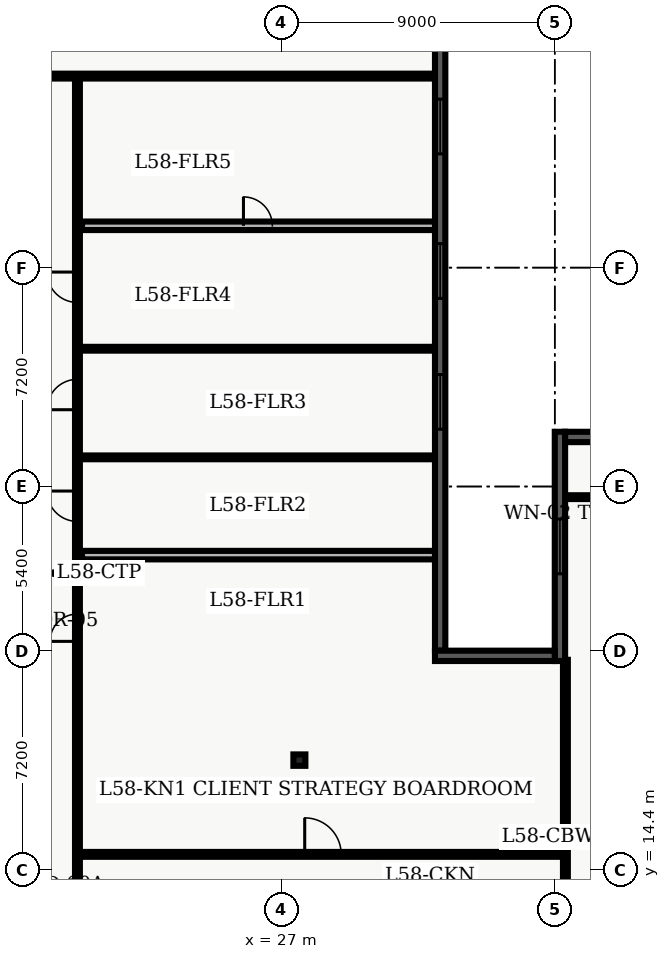
"""IFC4 building model, lengths in metres.
Left out: names, types, materials, properties, quantities, classifications, styles, units other than length and angle.
Written with IfcOpenShell. Run it as: python <this file> out.ifc"""

import sys

from ifc_helpers import new_model, entity, si_unit, converted_unit, direction, frame, origin_with_axes, origin_2d_with_axis, place, context, subcontext, project, spatial, polyline, rectangle, i_section, outline, extrude, element, fill, save


model = new_model("IFC4")
c1 = context("Model", 3, precision=1e-05, world=origin_with_axes(), true_north=direction((0.0, 1.0)))
c2 = subcontext(c1, "Body", "Model", "MODEL_VIEW")
j1 = project(units=[si_unit("LENGTHUNIT", "METRE"), converted_unit("PLANEANGLEUNIT", "DEGREE", entity("IfcPlaneAngleMeasure", 0.017), si_unit("PLANEANGLEUNIT", "RADIAN"), dimensions=[0, 0, 0, 0, 0, 0, 0])], contexts=[c1])
p1 = place(None, origin_with_axes())
s1 = spatial("IfcSite", under=j1, at=p1, CompositionType="ELEMENT")
p2 = place(p1, origin_with_axes())
s2 = spatial("IfcBuilding", under=s1, at=p2, CompositionType="ELEMENT")
p3 = place(p2, frame((0.0, 0.0, 236.4), z_axis=(0.0, 0.0, 1.0), x_axis=(1.0, 0.0, 0.0)))
s3 = spatial("IfcBuildingStorey", under=s2, at=p3, CompositionType="ELEMENT", Elevation=236.4)
p4 = place(p3, frame((27.6, 18.0, 0.0), z_axis=(0.0, 0.0, 1.0), x_axis=(1.0, 0.0, 0.0)))
e1 = element("IfcColumn", 1, at=p4, inside=s3, PredefinedType="COLUMN", context=c2, shape_type="SweptSolid", body=[
    extrude(i_section(OverallWidth=0.394, OverallDepth=0.375, WebThickness=0.017, FlangeThickness=0.028, FilletRadius=0.02, at=origin_2d_with_axis()), origin_with_axes(), (0.0, 0.0, 1.0), 3.9),
])
p5 = place(p3, frame((7.1, 40.5, 0.0), z_axis=(0.0, 0.0, 1.0), x_axis=(1.0, 0.0, 0.0)))
e2 = element("IfcWall", 2, at=p5, inside=s3, PredefinedType="PARTITIONING", context=c2, shape_type="SweptSolid", body=[
    extrude(outline(polyline([(0.0, -0.08), (24.965, -0.08), (24.965, 0.08), (0.0, 0.08), (0.0, -0.08)])), origin_with_axes(), (0.0, 0.0, 1.0), 2.7),
])
p6 = place(p5, frame((1.441, 0.0, 0.0), z_axis=(0.0, 0.0, 1.0), x_axis=(1.0, 0.0, 0.0)))
e3 = element("IfcOpeningElement", 3, at=p6, cuts=e2, PredefinedType="OPENING", context=c2, shape_type="SweptSolid", body=[
    extrude(rectangle(XDim=1.0, YDim=0.18, at=origin_2d_with_axis()), origin_with_axes(), (0.0, 0.0, 1.0), 2.15),
])
p7 = place(p5, frame((4.415, 0.0, 0.0), z_axis=(0.0, 0.0, 1.0), x_axis=(1.0, 0.0, 0.0)))
e4 = element("IfcOpeningElement", 4, at=p7, cuts=e2, PredefinedType="OPENING", context=c2, shape_type="SweptSolid", body=[
    extrude(rectangle(XDim=1.0, YDim=0.18, at=origin_2d_with_axis()), origin_with_axes(), (0.0, 0.0, 1.0), 2.15),
])
p8 = place(p5, frame((7.614, 0.0, 0.0), z_axis=(0.0, 0.0, 1.0), x_axis=(1.0, 0.0, 0.0)))
e5 = element("IfcOpeningElement", 5, at=p8, cuts=e2, PredefinedType="OPENING", context=c2, shape_type="SweptSolid", body=[
    extrude(rectangle(XDim=1.0, YDim=0.18, at=origin_2d_with_axis()), origin_with_axes(), (0.0, 0.0, 1.0), 2.15),
])
p9 = place(p5, frame((11.156, 0.0, 0.0), z_axis=(0.0, 0.0, 1.0), x_axis=(1.0, 0.0, 0.0)))
e6 = element("IfcOpeningElement", 6, at=p9, cuts=e2, PredefinedType="OPENING", context=c2, shape_type="SweptSolid", body=[
    extrude(rectangle(XDim=1.0, YDim=0.18, at=origin_2d_with_axis()), origin_with_axes(), (0.0, 0.0, 1.0), 2.15),
])
p10 = place(p3, frame((20.3, 7.8, 0.0), z_axis=(0.0, 0.0, 1.0), x_axis=(0.0, 1.0, 0.0)))
e7 = element("IfcWall", 7, at=p10, inside=s3, PredefinedType="PARTITIONING", context=c2, shape_type="SweptSolid", body=[
    extrude(outline(polyline([(0.0, -0.08), (32.7, -0.08), (32.7, 0.08), (0.0, 0.08), (0.0, -0.08)])), origin_with_axes(), (0.0, 0.0, 1.0), 2.7),
])
p11 = place(p10, frame((14.556, 0.0, 0.0), z_axis=(0.0, 0.0, 1.0), x_axis=(1.0, 0.0, 0.0)))
e8 = element("IfcOpeningElement", 8, at=p11, cuts=e7, PredefinedType="OPENING", context=c2, shape_type="SweptSolid", body=[
    extrude(rectangle(XDim=0.9, YDim=0.18, at=origin_2d_with_axis()), origin_with_axes(), (0.0, 0.0, 1.0), 2.15),
])
p12 = place(p10, frame((18.551, 0.0, 0.0), z_axis=(0.0, 0.0, 1.0), x_axis=(1.0, 0.0, 0.0)))
e9 = element("IfcOpeningElement", 9, at=p12, cuts=e7, PredefinedType="OPENING", context=c2, shape_type="SweptSolid", body=[
    extrude(rectangle(XDim=1.0, YDim=0.18, at=origin_2d_with_axis()), origin_with_axes(), (0.0, 0.0, 1.0), 2.15),
])
p13 = place(p10, frame((22.226, 0.0, 0.0), z_axis=(0.0, 0.0, 1.0), x_axis=(1.0, 0.0, 0.0)))
e10 = element("IfcOpeningElement", 10, at=p13, cuts=e7, PredefinedType="OPENING", context=c2, shape_type="SweptSolid", body=[
    extrude(rectangle(XDim=1.0, YDim=0.18, at=origin_2d_with_axis()), origin_with_axes(), (0.0, 0.0, 1.0), 2.15),
])
p14 = place(p10, frame((25.754, 0.0, 0.0), z_axis=(0.0, 0.0, 1.0), x_axis=(1.0, 0.0, 0.0)))
e11 = element("IfcOpeningElement", 11, at=p14, cuts=e7, PredefinedType="OPENING", context=c2, shape_type="SweptSolid", body=[
    extrude(rectangle(XDim=1.0, YDim=0.18, at=origin_2d_with_axis()), origin_with_axes(), (0.0, 0.0, 1.0), 2.15),
])
p15 = place(p10, frame((5.775, 0.0, 0.0), z_axis=(0.0, 0.0, 1.0), x_axis=(1.0, 0.0, 0.0)))
e12 = element("IfcOpeningElement", 12, at=p15, cuts=e7, PredefinedType="OPENING", context=c2, shape_type="SweptSolid", body=[
    extrude(rectangle(XDim=1.05, YDim=0.18, at=origin_2d_with_axis()), origin_with_axes(), (0.0, 0.0, 1.0), 2.15),
])
p16 = place(p3, frame((20.45, 24.743, 0.0), z_axis=(0.0, 0.0, 1.0), x_axis=(1.0, 0.0, 0.0)))
e13 = element("IfcWall", 13, at=p16, inside=s3, PredefinedType="PARTITIONING", context=c2, shape_type="SweptSolid", body=[
    extrude(outline(polyline([(0.0, -0.14), (11.615, -0.14), (11.615, 0.14), (0.0, 0.14), (0.0, -0.14)])), origin_with_axes(), (0.0, 0.0, 1.0), 2.7),
])
for number, where, z_axis, x_axis in (
    (14, (20.45, 27.959, 0.0), (0.0, 0.0, 1.0), (1.0, 0.0, 0.0)),
    (15, (20.45, 31.532, 0.0), (0.0, 0.0, 1.0), (1.0, 0.0, 0.0)),
):
    element("IfcWall", number, at=place(p3, frame(where, z_axis=z_axis, x_axis=x_axis)), inside=s3, PredefinedType="PARTITIONING", context=c2, shape_type="SweptSolid", body=[
        extrude(outline(polyline([(0.0, -0.062), (11.615, -0.062), (11.615, 0.062), (0.0, 0.062), (0.0, -0.062)])), origin_with_axes(), (0.0, 0.0, 1.0), 2.7),
    ])
p17 = place(p3, frame((20.45, 35.576, 0.0), z_axis=(0.0, 0.0, 1.0), x_axis=(1.0, 0.0, 0.0)))
e16 = element("IfcWall", 16, at=p17, inside=s3, PredefinedType="PARTITIONING", context=c2, shape_type="SweptSolid", body=[
    extrude(outline(polyline([(0.0, -0.14), (11.615, -0.14), (11.615, 0.14), (0.0, 0.14), (0.0, -0.14)])), origin_with_axes(), (0.0, 0.0, 1.0), 2.7),
])
p18 = place(p17, frame((5.785, 0.0, 0.0), z_axis=(0.0, 0.0, 1.0), x_axis=(1.0, 0.0, 0.0)))
e17 = element("IfcOpeningElement", 17, at=p18, cuts=e16, PredefinedType="OPENING", context=c2, shape_type="SweptSolid", body=[
    extrude(rectangle(XDim=0.95, YDim=0.3, at=origin_2d_with_axis()), origin_with_axes(), (0.0, 0.0, 1.0), 2.15),
])
p19 = place(p3, frame((20.3, 14.9, 0.0), z_axis=(0.0, 0.0, 1.0), x_axis=(1.0, 0.0, 0.0)))
e18 = element("IfcWall", 18, at=p19, inside=s3, PredefinedType="PARTITIONING", context=c2, shape_type="SweptSolid", body=[
    extrude(outline(polyline([(0.0, -0.08), (16.05, -0.08), (16.05, 0.08), (0.0, 0.08), (0.0, -0.08)])), origin_with_axes(), (0.0, 0.0, 1.0), 2.7),
])
p20 = place(p19, frame((8.075, 0.0, 0.0), z_axis=(0.0, 0.0, 1.0), x_axis=(1.0, 0.0, 0.0)))
e19 = element("IfcOpeningElement", 19, at=p20, cuts=e18, PredefinedType="OPENING", context=c2, shape_type="SweptSolid", body=[
    extrude(rectangle(XDim=1.2, YDim=0.18, at=origin_2d_with_axis()), origin_with_axes(), (0.0, 0.0, 1.0), 2.2),
])
p21 = place(p3, frame((36.35, 4.35, 0.0), z_axis=(0.0, 0.0, 1.0), x_axis=(0.0, 1.0, 0.0)))
e20 = element("IfcWall", 20, at=p21, inside=s3, PredefinedType="PARTITIONING", context=c2, shape_type="SweptSolid", body=[
    extrude(outline(polyline([(0.0, -0.08), (16.95, -0.08), (16.95, 0.08), (0.0, 0.08), (0.0, -0.08)])), origin_with_axes(), (0.0, 0.0, 1.0), 2.7),
])
p22 = place(p3, frame((36.335, 26.65, 0.0), z_axis=(0.0, 0.0, 1.0), x_axis=(1.0, 0.0, 0.0)))
e21 = element("IfcWall", 21, at=p22, inside=s3, PredefinedType="PARTITIONING", context=c2, shape_type="SweptSolid", body=[
    extrude(outline(polyline([(0.0, -0.062), (11.195, -0.062), (11.195, 0.062), (0.0, 0.062), (0.0, -0.062)])), origin_with_axes(), (0.0, 0.0, 1.0), 2.7),
])
p23 = place(p22, frame((6.665, 0.0, 0.0), z_axis=(0.0, 0.0, 1.0), x_axis=(1.0, 0.0, 0.0)))
e22 = element("IfcOpeningElement", 22, at=p23, cuts=e21, PredefinedType="OPENING", context=c2, shape_type="SweptSolid", body=[
    extrude(rectangle(XDim=1.0, YDim=0.145, at=origin_2d_with_axis()), origin_with_axes(), (0.0, 0.0, 1.0), 2.15),
])
p24 = place(p3, frame((36.17, 21.26, 0.0), z_axis=(0.0, 0.0, 1.0), x_axis=(0.0, 1.0, 0.0)))
e23 = element("IfcWall", 23, at=p24, inside=s3, PredefinedType="SOLIDWALL", context=c2, shape_type="SweptSolid", body=[
    extrude(outline(polyline([(0.0, -0.17), (7.54, -0.17), (7.54, 0.17), (0.0, 0.17), (0.0, -0.17)])), origin_with_axes(), (0.0, 0.0, 1.0), 3.66),
])
p25 = place(p24, frame((3.77, 0.0, 0.45), z_axis=(0.0, 0.0, 1.0), x_axis=(1.0, 0.0, 0.0)))
e24 = element("IfcOpeningElement", 24, at=p25, cuts=e23, PredefinedType="OPENING", context=c2, shape_type="SweptSolid", body=[
    extrude(rectangle(XDim=1.8, YDim=0.36, at=origin_2d_with_axis()), origin_with_axes(), (0.0, 0.0, 1.0), 2.1),
])
p26 = place(p3, frame((36.34, 28.63, 0.0), z_axis=(0.0, 0.0, 1.0), x_axis=(1.0, 0.0, 0.0)))
e25 = element("IfcWall", 25, at=p26, inside=s3, PredefinedType="SOLIDWALL", context=c2, shape_type="SweptSolid", body=[
    extrude(outline(polyline([(0.0, -0.17), (13.46, -0.17), (13.46, 0.17), (0.0, 0.17), (0.0, -0.17)])), origin_with_axes(), (0.0, 0.0, 1.0), 3.66),
])
p27 = place(p26, frame((3.665, 0.0, 0.45), z_axis=(0.0, 0.0, 1.0), x_axis=(1.0, 0.0, 0.0)))
e26 = element("IfcOpeningElement", 26, at=p27, cuts=e25, PredefinedType="OPENING", context=c2, shape_type="SweptSolid", body=[
    extrude(rectangle(XDim=1.8, YDim=0.36, at=origin_2d_with_axis()), origin_with_axes(), (0.0, 0.0, 1.0), 2.1),
])
p28 = place(p26, frame((9.795, 0.0, 0.45), z_axis=(0.0, 0.0, 1.0), x_axis=(1.0, 0.0, 0.0)))
e27 = element("IfcOpeningElement", 27, at=p28, cuts=e25, PredefinedType="OPENING", context=c2, shape_type="SweptSolid", body=[
    extrude(rectangle(XDim=1.8, YDim=0.36, at=origin_2d_with_axis()), origin_with_axes(), (0.0, 0.0, 1.0), 2.1),
])
p29 = place(p3, frame((32.23, 41.82, 0.0), z_axis=(0.0, 0.0, 1.0), x_axis=(0.0, -1.0, 0.0)))
e28 = element("IfcWall", 28, at=p29, inside=s3, PredefinedType="SOLIDWALL", context=c2, shape_type="SweptSolid", body=[
    extrude(outline(polyline([(0.0, -0.17), (20.22, -0.17), (20.22, 0.17), (0.0, 0.17), (0.0, -0.17)])), origin_with_axes(), (0.0, 0.0, 1.0), 3.66),
])
p30 = place(p29, frame((2.978, 0.0, 0.45), z_axis=(0.0, 0.0, 1.0), x_axis=(1.0, 0.0, 0.0)))
e29 = element("IfcOpeningElement", 29, at=p30, cuts=e28, PredefinedType="OPENING", context=c2, shape_type="SweptSolid", body=[
    extrude(rectangle(XDim=1.8, YDim=0.36, at=origin_2d_with_axis()), origin_with_axes(), (0.0, 0.0, 1.0), 2.1),
])
p31 = place(p29, frame((7.732, 0.0, 0.45), z_axis=(0.0, 0.0, 1.0), x_axis=(1.0, 0.0, 0.0)))
e30 = element("IfcOpeningElement", 30, at=p31, cuts=e28, PredefinedType="OPENING", context=c2, shape_type="SweptSolid", body=[
    extrude(rectangle(XDim=1.8, YDim=0.36, at=origin_2d_with_axis()), origin_with_axes(), (0.0, 0.0, 1.0), 2.1),
])
p32 = place(p29, frame((12.037, 0.0, 0.45), z_axis=(0.0, 0.0, 1.0), x_axis=(1.0, 0.0, 0.0)))
e31 = element("IfcOpeningElement", 31, at=p32, cuts=e28, PredefinedType="OPENING", context=c2, shape_type="SweptSolid", body=[
    extrude(rectangle(XDim=1.8, YDim=0.36, at=origin_2d_with_axis()), origin_with_axes(), (0.0, 0.0, 1.0), 2.1),
])
p33 = place(p3, frame((32.06, 21.43, 0.0), z_axis=(0.0, 0.0, 1.0), x_axis=(1.0, 0.0, 0.0)))
e32 = element("IfcWall", 32, at=p33, inside=s3, PredefinedType="SOLIDWALL", context=c2, shape_type="SweptSolid", body=[
    extrude(outline(polyline([(0.0, -0.17), (3.94, -0.17), (3.94, 0.17), (0.0, 0.17), (0.0, -0.17)])), origin_with_axes(), (0.0, 0.0, 1.0), 3.66),
])
p34 = place(p10, frame((14.556, 0.0, 0.0), z_axis=(0.0, 0.0, 1.0), x_axis=(1.0, 0.0, 0.0)))
e33 = element("IfcDoor", 33, at=p34, inside=s3, OperationType="SINGLE_SWING_LEFT", PredefinedType="DOOR", context=c2, shape_type="SweptSolid", body=[
    extrude(rectangle(XDim=0.9, YDim=0.09, at=origin_2d_with_axis()), origin_with_axes(), (0.0, 0.0, 1.0), 2.15),
])
fill(e8, e33)
p35 = place(p10, frame((18.551, 0.0, 0.0), z_axis=(0.0, 0.0, 1.0), x_axis=(1.0, 0.0, 0.0)))
e34 = element("IfcDoor", 34, at=p35, inside=s3, OperationType="SINGLE_SWING_RIGHT", PredefinedType="DOOR", context=c2, shape_type="SweptSolid", body=[
    extrude(rectangle(XDim=1.0, YDim=0.09, at=origin_2d_with_axis()), origin_with_axes(), (0.0, 0.0, 1.0), 2.15),
])
fill(e9, e34)
p36 = place(p10, frame((22.226, 0.0, 0.0), z_axis=(0.0, 0.0, 1.0), x_axis=(1.0, 0.0, 0.0)))
e35 = element("IfcDoor", 35, at=p36, inside=s3, OperationType="SINGLE_SWING_LEFT", PredefinedType="DOOR", context=c2, shape_type="SweptSolid", body=[
    extrude(rectangle(XDim=1.0, YDim=0.09, at=origin_2d_with_axis()), origin_with_axes(), (0.0, 0.0, 1.0), 2.15),
])
fill(e10, e35)
p37 = place(p10, frame((25.754, 0.0, 0.0), z_axis=(0.0, 0.0, 1.0), x_axis=(1.0, 0.0, 0.0)))
e36 = element("IfcDoor", 36, at=p37, inside=s3, OperationType="SINGLE_SWING_RIGHT", PredefinedType="DOOR", context=c2, shape_type="SweptSolid", body=[
    extrude(rectangle(XDim=1.0, YDim=0.09, at=origin_2d_with_axis()), origin_with_axes(), (0.0, 0.0, 1.0), 2.15),
])
fill(e11, e36)
p38 = place(p17, frame((5.785, 0.0, 0.0), z_axis=(0.0, 0.0, 1.0), x_axis=(1.0, 0.0, 0.0)))
e37 = element("IfcDoor", 37, at=p38, inside=s3, OperationType="SINGLE_SWING_LEFT", PredefinedType="DOOR", context=c2, shape_type="SweptSolid", body=[
    extrude(rectangle(XDim=0.95, YDim=0.09, at=origin_2d_with_axis()), origin_with_axes(), (0.0, 0.0, 1.0), 2.15),
])
fill(e17, e37)
p39 = place(p10, frame((5.775, 0.0, 0.0), z_axis=(0.0, 0.0, 1.0), x_axis=(1.0, 0.0, 0.0)))
e38 = element("IfcDoor", 38, at=p39, inside=s3, OperationType="SINGLE_SWING_LEFT", PredefinedType="DOOR", context=c2, shape_type="SweptSolid", body=[
    extrude(rectangle(XDim=1.05, YDim=0.09, at=origin_2d_with_axis()), origin_with_axes(), (0.0, 0.0, 1.0), 2.15),
])
fill(e12, e38)
p40 = place(p19, frame((8.075, 0.0, 0.0), z_axis=(0.0, 0.0, 1.0), x_axis=(1.0, 0.0, 0.0)))
e39 = element("IfcDoor", 39, at=p40, inside=s3, OperationType="SINGLE_SWING_LEFT", PredefinedType="DOOR", context=c2, shape_type="SweptSolid", body=[
    extrude(rectangle(XDim=1.2, YDim=0.09, at=origin_2d_with_axis()), origin_with_axes(), (0.0, 0.0, 1.0), 2.2),
])
fill(e19, e39)
p41 = place(p24, frame((3.77, 0.0, 0.45), z_axis=(0.0, 0.0, 1.0), x_axis=(1.0, 0.0, 0.0)))
e40 = element("IfcWindow", 40, at=p41, inside=s3, PredefinedType="WINDOW", context=c2, shape_type="SweptSolid", body=[
    extrude(rectangle(XDim=1.8, YDim=0.09, at=origin_2d_with_axis()), origin_with_axes(), (0.0, 0.0, 1.0), 2.1),
])
fill(e24, e40)
p42 = place(p29, frame((2.978, 0.0, 0.45), z_axis=(0.0, 0.0, 1.0), x_axis=(1.0, 0.0, 0.0)))
e41 = element("IfcWindow", 41, at=p42, inside=s3, PredefinedType="WINDOW", context=c2, shape_type="SweptSolid", body=[
    extrude(rectangle(XDim=1.8, YDim=0.09, at=origin_2d_with_axis()), origin_with_axes(), (0.0, 0.0, 1.0), 2.1),
])
fill(e29, e41)
p43 = place(p29, frame((7.732, 0.0, 0.45), z_axis=(0.0, 0.0, 1.0), x_axis=(1.0, 0.0, 0.0)))
e42 = element("IfcWindow", 42, at=p43, inside=s3, PredefinedType="WINDOW", context=c2, shape_type="SweptSolid", body=[
    extrude(rectangle(XDim=1.8, YDim=0.09, at=origin_2d_with_axis()), origin_with_axes(), (0.0, 0.0, 1.0), 2.1),
])
fill(e30, e42)
p44 = place(p29, frame((12.037, 0.0, 0.45), z_axis=(0.0, 0.0, 1.0), x_axis=(1.0, 0.0, 0.0)))
e43 = element("IfcWindow", 43, at=p44, inside=s3, PredefinedType="WINDOW", context=c2, shape_type="SweptSolid", body=[
    extrude(rectangle(XDim=1.8, YDim=0.09, at=origin_2d_with_axis()), origin_with_axes(), (0.0, 0.0, 1.0), 2.1),
])
fill(e31, e43)
save(model, sys.argv[1])
